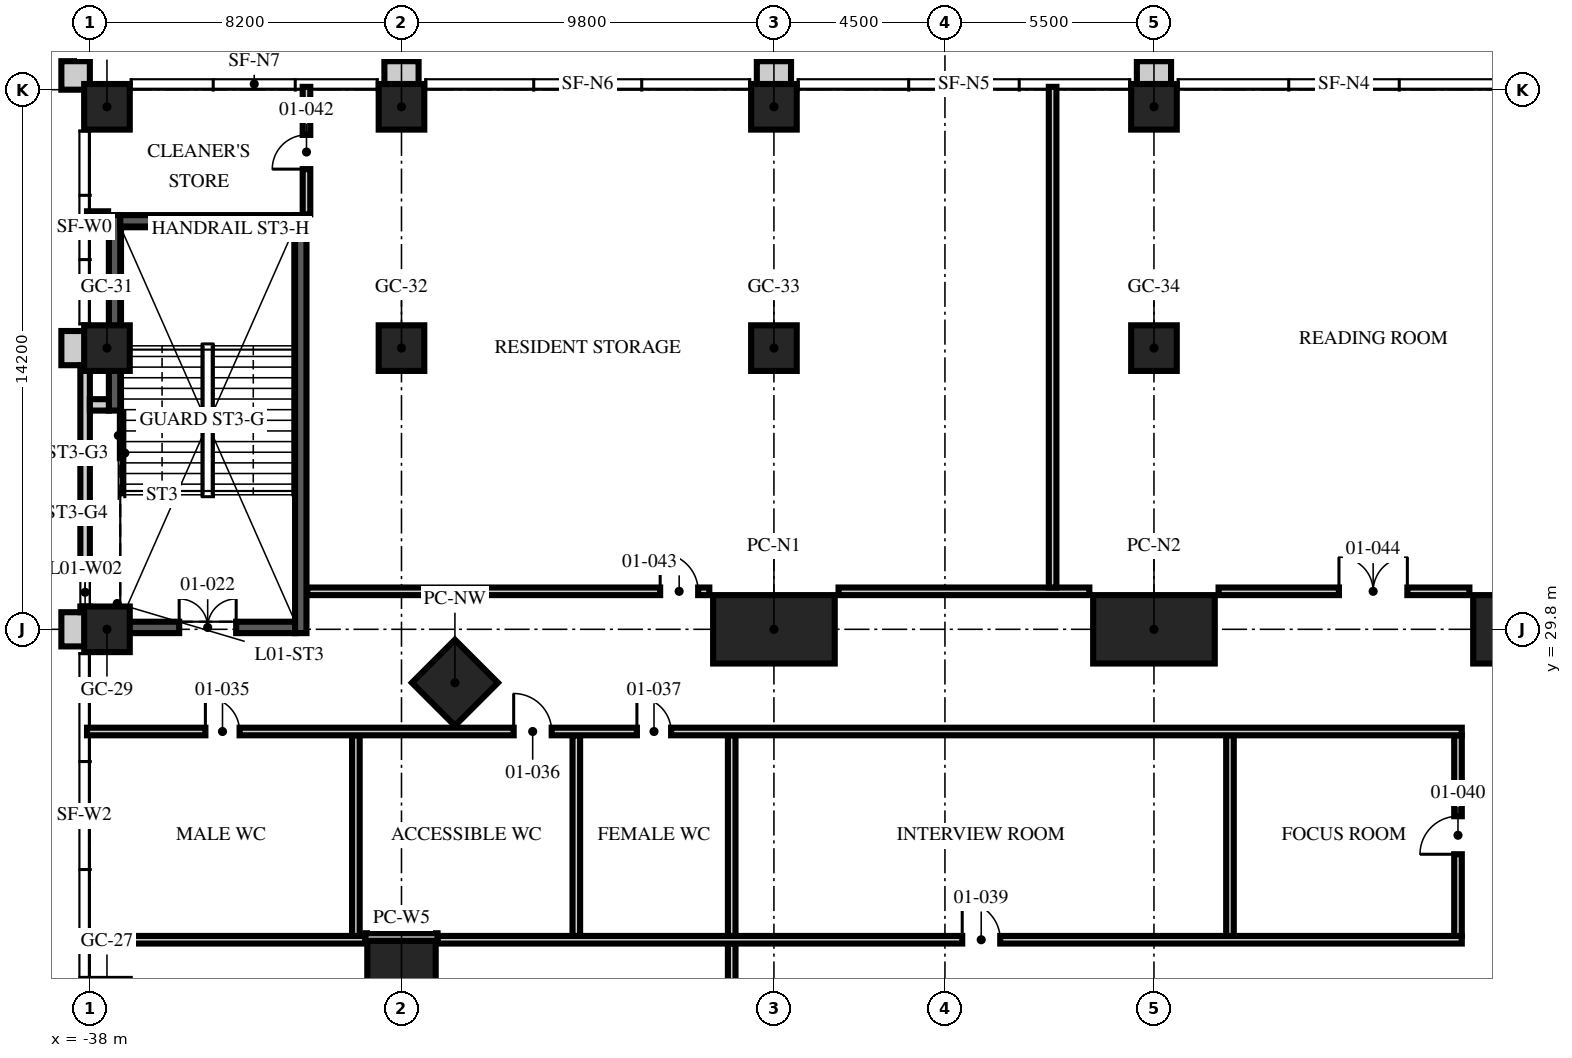
"""IFC4 building model, lengths in metres.
Left out: names, types, materials, properties, quantities, classifications, styles, units other than length and angle.
Written with IfcOpenShell. Run it as: python <this file> out.ifc"""

import sys

from ifc_helpers import new_model, si_unit, direction, frame, frame_2d, origin, origin_2d, place, context, subcontext, project, spatial, rectangle, hollow_rectangle, extrude, element, fill, save


model = new_model("IFC4")
c1 = context("Model", 3, precision=1e-05, world=origin(), true_north=direction((0.0, 1.0)))
c2 = subcontext(c1, "Body", "Model", "MODEL_VIEW")
j1 = project(units=[si_unit("LENGTHUNIT", "METRE"), si_unit("PLANEANGLEUNIT", "RADIAN")], contexts=[c1])
p1 = place(None, origin())
s1 = spatial("IfcSite", under=j1, at=p1, CompositionType="ELEMENT")
p2 = place(p1, origin())
s2 = spatial("IfcBuilding", under=s1, at=p2, CompositionType="ELEMENT")
p3 = place(p2, frame((0.0, 0.0, 6.0)))
s3 = spatial("IfcBuildingStorey", under=s2, at=p3, CompositionType="ELEMENT", Elevation=6.0)
for number, where, z_axis, x_axis in (
    (1, (-20.0, 29.8, 0.0), (0.0, 0.0, 1.0), (1.0, 0.0, 0.0)),
    (2, (-10.0, 29.8, 0.0), (0.0, 0.0, 1.0), (1.0, 0.0, 0.0)),
    (3, (0.0, 29.8, 0.0), (0.0, 0.0, 1.0), (1.0, 0.0, 0.0)),
    (4, (-29.8, 20.0, 0.0), (0.0, 0.0, 1.0), (0.0, 1.0, 0.0)),
):
    element("IfcColumn", number, at=place(p3, frame(where, z_axis=z_axis, x_axis=x_axis)), inside=s3, PredefinedType="COLUMN", context=c2, shape_type="SweptSolid", body=[
        extrude(hollow_rectangle(XDim=3.2, YDim=1.8, WallThickness=0.2, at=origin_2d()), origin(), (0.0, 0.0, 1.0), 5.0),
    ])
p4 = place(p3, frame((-28.394, 28.394, 0.0), z_axis=(0.0, 0.0, 1.0), x_axis=(0.707106781187, 0.707106781187, 0.0)))
e5 = element("IfcColumn", 5, at=p4, inside=s3, PredefinedType="COLUMN", context=c2, shape_type="SweptSolid", body=[
    extrude(hollow_rectangle(XDim=1.6, YDim=1.6, WallThickness=0.1, at=origin_2d()), origin(), (0.0, 0.0, 1.0), 5.0),
])
for number, where, z_axis, x_axis in (
    (6, (-37.55, 29.8, 0.0), (0.0, 0.0, 1.0), (1.0, 0.0, 0.0)),
    (7, (-37.55, 37.2, 0.0), (0.0, 0.0, 1.0), (1.0, 0.0, 0.0)),
    (8, (-29.8, 37.2, 0.0), (0.0, 0.0, 1.0), (1.0, 0.0, 0.0)),
    (9, (-20.0, 37.2, 0.0), (0.0, 0.0, 1.0), (1.0, 0.0, 0.0)),
    (10, (-10.0, 37.2, 0.0), (0.0, 0.0, 1.0), (1.0, 0.0, 0.0)),
    (11, (-37.55, 43.55, 0.0), (0.0, 0.0, 1.0), (1.0, 0.0, 0.0)),
    (12, (-29.8, 43.55, 0.0), (0.0, 0.0, 1.0), (1.0, 0.0, 0.0)),
    (13, (-20.0, 43.55, 0.0), (0.0, 0.0, 1.0), (1.0, 0.0, 0.0)),
    (14, (-10.0, 43.55, 0.0), (0.0, 0.0, 1.0), (1.0, 0.0, 0.0)),
):
    element("IfcColumn", number, at=place(p3, frame(where, z_axis=z_axis, x_axis=x_axis)), inside=s3, PredefinedType="COLUMN", context=c2, shape_type="SweptSolid", body=[
        extrude(rectangle(XDim=1.2, YDim=1.2, at=origin_2d()), origin(), (0.0, 0.0, 1.0), 5.0),
    ])
for number, where, z_axis, x_axis in (
    (15, (-9.55, 44.375, 0.0), (0.0, 0.0, 1.0), (-1.0, 0.0, 0.0)),
    (16, (-19.55, 44.375, 0.0), (0.0, 0.0, 1.0), (-1.0, 0.0, 0.0)),
    (17, (-29.35, 44.375, 0.0), (0.0, 0.0, 1.0), (-1.0, 0.0, 0.0)),
):
    element("IfcWall", number, at=place(p3, frame(where, z_axis=z_axis, x_axis=x_axis)), inside=s3, PredefinedType="SOLIDWALL", context=c2, shape_type="SweptSolid", body=[
        extrude(rectangle(XDim=0.9, YDim=0.75, at=frame_2d((0.45, 0.0))), origin(), (0.0, 0.0, 1.0), 5.0),
    ])
p5 = place(p3, frame((-38.0, 44.375, 0.0), z_axis=(0.0, 0.0, 1.0), x_axis=(-1.0, 0.0, 0.0)))
e18 = element("IfcWall", 18, at=p5, inside=s3, PredefinedType="SOLIDWALL", context=c2, shape_type="SweptSolid", body=[
    extrude(rectangle(XDim=0.75, YDim=0.75, at=frame_2d((0.375, 0.0))), origin(), (0.0, 0.0, 1.0), 5.0),
])
for number, where, z_axis, x_axis in (
    (19, (-38.375, 37.65, 0.0), (0.0, 0.0, 1.0), (0.0, -1.0, 0.0)),
    (20, (-38.375, 30.25, 0.0), (0.0, 0.0, 1.0), (0.0, -1.0, 0.0)),
):
    element("IfcWall", number, at=place(p3, frame(where, z_axis=z_axis, x_axis=x_axis)), inside=s3, PredefinedType="SOLIDWALL", context=c2, shape_type="SweptSolid", body=[
        extrude(rectangle(XDim=0.9, YDim=0.75, at=frame_2d((0.45, 0.0))), origin(), (0.0, 0.0, 1.0), 5.0),
    ])
p6 = place(p3, frame((-38.125, 36.75, 0.0), z_axis=(0.0, 0.0, 1.0), x_axis=(0.0, -1.0, 0.0)))
e21 = element("IfcWall", 21, at=p6, inside=s3, PredefinedType="SOLIDWALL", context=c2, shape_type="SweptSolid", body=[
    extrude(rectangle(XDim=6.5, YDim=0.25, at=frame_2d((3.25, 0.0))), origin(), (0.0, 0.0, 1.0), 5.0),
])
p7 = place(p6, frame((5.6, 0.0, 1.2)))
e22 = element("IfcOpeningElement", 22, at=p7, cuts=e21, PredefinedType="OPENING", context=c2, shape_type="SweptSolid", body=[
    extrude(rectangle(XDim=0.75, YDim=1.7, at=frame_2d((0.375, 0.85))), frame((0.0, 0.135, 0.0), z_axis=(0.0, -1.0, 0.0), x_axis=(1.0, 0.0, 0.0)), (0.0, 0.0, 1.0), 0.27),
])
p8 = place(p3, frame((-37.35, 35.556, 0.0), z_axis=(0.0, 0.0, 1.0), x_axis=(0.0, 1.0, 0.0)))
e23 = element("IfcWall", 23, at=p8, inside=s3, PredefinedType="SOLIDWALL", context=c2, shape_type="SweptSolid", body=[
    extrude(rectangle(XDim=5.144, YDim=0.3, at=frame_2d((2.572, 0.0))), origin(), (0.0, 0.0, 1.0), 4.7),
])
p9 = place(p3, frame((-38.0, 35.706, 0.0), z_axis=(0.0, 0.0, 1.0), x_axis=(1.0, 0.0, 0.0)))
e24 = element("IfcWall", 24, at=p9, inside=s3, PredefinedType="PARTITIONING", context=c2, shape_type="SweptSolid", body=[
    extrude(rectangle(XDim=0.5, YDim=0.3, at=frame_2d((0.25, 0.0))), origin(), (0.0, 0.0, 1.0), 3.27),
])
p10 = place(p3, frame((-38.0, 29.85, 0.0), z_axis=(0.0, 0.0, 1.0), x_axis=(1.0, 0.0, 0.0)))
e25 = element("IfcWall", 25, at=p10, inside=s3, PredefinedType="SOLIDWALL", context=c2, shape_type="SweptSolid", body=[
    extrude(rectangle(XDim=5.4, YDim=0.3, at=frame_2d((2.7, 0.0))), origin(), (0.0, 0.0, 1.0), 4.7),
])
p11 = place(p10, frame((2.35, 0.0, 0.0)))
e26 = element("IfcOpeningElement", 26, at=p11, cuts=e25, PredefinedType="OPENING", context=c2, shape_type="SweptSolid", body=[
    extrude(rectangle(XDim=1.5, YDim=2.1, at=frame_2d((0.75, 1.05))), frame((0.0, 0.16, 0.0), z_axis=(0.0, -1.0, 0.0), x_axis=(1.0, 0.0, 0.0)), (0.0, 0.0, 1.0), 0.32),
])
p12 = place(p3, frame((-32.45, 29.7, 0.0), z_axis=(0.0, 0.0, 1.0), x_axis=(0.0, 1.0, 0.0)))
e27 = element("IfcWall", 27, at=p12, inside=s3, PredefinedType="SOLIDWALL", context=c2, shape_type="SweptSolid", body=[
    extrude(rectangle(XDim=11.0, YDim=0.3, at=frame_2d((5.5, 0.0))), origin(), (0.0, 0.0, 1.0), 4.7),
])
p13 = place(p3, frame((-37.2, 40.55, 0.0), z_axis=(0.0, 0.0, 1.0), x_axis=(1.0, 0.0, 0.0)))
e28 = element("IfcWall", 28, at=p13, inside=s3, PredefinedType="SOLIDWALL", context=c2, shape_type="SweptSolid", body=[
    extrude(rectangle(XDim=4.6, YDim=0.3, at=frame_2d((2.3, 0.0))), origin(), (0.0, 0.0, 1.0), 4.7),
])
p14 = place(p3, frame((-21.111, -20.491, 0.0), z_axis=(0.0, 0.0, 1.0), x_axis=(0.0, 1.0, 0.0)))
e29 = element("IfcWall", 29, at=p14, inside=s3, PredefinedType="SOLIDWALL", context=c2, shape_type="SweptSolid", body=[
    extrude(rectangle(XDim=42.022, YDim=0.2, at=frame_2d((21.011, 0.0))), origin(), (0.0, 0.0, 1.0), 3.5),
])
p15 = place(p14, frame((4.47, 0.0, 0.0)))
e30 = element("IfcOpeningElement", 30, at=p15, cuts=e29, PredefinedType="OPENING", context=c2, shape_type="SweptSolid", body=[
    extrude(rectangle(XDim=1.8, YDim=2.4, at=frame_2d((0.9, 1.2))), frame((0.0, 0.11, 0.0), z_axis=(0.0, -1.0, 0.0), x_axis=(1.0, 0.0, 0.0)), (0.0, 0.0, 1.0), 0.22),
])
p16 = place(p14, frame((17.537, 0.0, 0.0)))
e31 = element("IfcOpeningElement", 31, at=p16, cuts=e29, PredefinedType="OPENING", context=c2, shape_type="SweptSolid", body=[
    extrude(rectangle(XDim=1.0, YDim=2.1, at=frame_2d((0.5, 1.05))), frame((0.0, 0.11, 0.0), z_axis=(0.0, -1.0, 0.0), x_axis=(1.0, 0.0, 0.0)), (0.0, 0.0, 1.0), 0.22),
])
p17 = place(p14, frame((32.768, 0.0, 0.0)))
e32 = element("IfcOpeningElement", 32, at=p17, cuts=e29, PredefinedType="OPENING", context=c2, shape_type="SweptSolid", body=[
    extrude(rectangle(XDim=1.8, YDim=2.4, at=frame_2d((0.9, 1.2))), frame((0.0, 0.11, 0.0), z_axis=(0.0, -1.0, 0.0), x_axis=(1.0, 0.0, 0.0)), (0.0, 0.0, 1.0), 0.22),
])
p18 = place(p3, frame((-38.075, 21.631, 0.0), z_axis=(0.0, 0.0, 1.0), x_axis=(1.0, 0.0, 0.0)))
e33 = element("IfcWall", 33, at=p18, inside=s3, PredefinedType="SOLIDWALL", context=c2, shape_type="SweptSolid", body=[
    extrude(rectangle(XDim=7.325, YDim=0.2, at=frame_2d((3.663, 0.0))), origin(), (0.0, 0.0, 1.0), 3.7),
])
p19 = place(p3, frame((-28.85, 21.631, 0.0), z_axis=(0.0, 0.0, 1.0), x_axis=(1.0, 0.0, 0.0)))
e34 = element("IfcWall", 34, at=p19, inside=s3, PredefinedType="SOLIDWALL", context=c2, shape_type="SweptSolid", body=[
    extrude(rectangle(XDim=26.95, YDim=0.2, at=frame_2d((13.475, 0.0))), origin(), (0.0, 0.0, 1.0), 3.5),
])
p20 = place(p19, frame((13.804, 0.0, 0.0)))
e35 = element("IfcOpeningElement", 35, at=p20, cuts=e34, PredefinedType="OPENING", context=c2, shape_type="SweptSolid", body=[
    extrude(rectangle(XDim=1.0, YDim=2.1, at=frame_2d((0.5, 1.05))), frame((0.0, 0.11, 0.0), z_axis=(0.0, -1.0, 0.0), x_axis=(1.0, 0.0, 0.0)), (0.0, 0.0, 1.0), 0.22),
])
p21 = place(p3, frame((-30.75, 21.702, 0.0), z_axis=(0.0, 0.0, 1.0), x_axis=(1.0, 0.0, 0.0)))
e36 = element("IfcWall", 36, at=p21, inside=s3, PredefinedType="SOLIDWALL", context=c2, shape_type="SweptSolid", body=[
    extrude(rectangle(XDim=1.9, YDim=0.2, at=frame_2d((0.95, 0.0))), origin(), (0.0, 0.0, 1.0), 3.7),
])
p22 = place(p3, frame((-31.0, 21.731, 0.0), z_axis=(0.0, 0.0, 1.0), x_axis=(0.0, 1.0, 0.0)))
e37 = element("IfcWall", 37, at=p22, inside=s3, PredefinedType="SOLIDWALL", context=c2, shape_type="SweptSolid", body=[
    extrude(rectangle(XDim=5.28, YDim=0.2, at=frame_2d((2.64, 0.0))), origin(), (0.0, 0.0, 1.0), 4.7),
])
p23 = place(p3, frame((-25.2, 21.731, 0.0), z_axis=(0.0, 0.0, 1.0), x_axis=(0.0, 1.0, 0.0)))
e38 = element("IfcWall", 38, at=p23, inside=s3, PredefinedType="SOLIDWALL", context=c2, shape_type="SweptSolid", body=[
    extrude(rectangle(XDim=5.28, YDim=0.2, at=frame_2d((2.64, 0.0))), origin(), (0.0, 0.0, 1.0), 3.5),
])
for number, where, z_axis, x_axis in (
    (39, (-21.111, 21.731, 0.0), (0.0, 0.0, 1.0), (0.0, 1.0, 0.0)),
    (40, (-8.0, 21.731, 0.0), (0.0, 0.0, 1.0), (0.0, 1.0, 0.0)),
):
    element("IfcWall", number, at=place(p3, frame(where, z_axis=z_axis, x_axis=x_axis)), inside=s3, PredefinedType="SOLIDWALL", context=c2, shape_type="SweptSolid", body=[
        extrude(rectangle(XDim=5.28, YDim=0.2, at=frame_2d((2.64, 0.0))), origin(), (0.0, 0.0, 1.0), 4.7),
    ])
p24 = place(p3, frame((-2.0, 21.731, 0.0), z_axis=(0.0, 0.0, 1.0), x_axis=(0.0, 1.0, 0.0)))
e41 = element("IfcWall", 41, at=p24, inside=s3, PredefinedType="SOLIDWALL", context=c2, shape_type="SweptSolid", body=[
    extrude(rectangle(XDim=5.28, YDim=0.2, at=frame_2d((2.64, 0.0))), origin(), (0.0, 0.0, 1.0), 4.7),
])
p25 = place(p24, frame((2.15, 0.0, 0.0)))
e42 = element("IfcOpeningElement", 42, at=p25, cuts=e41, PredefinedType="OPENING", context=c2, shape_type="SweptSolid", body=[
    extrude(rectangle(XDim=1.0, YDim=2.1, at=frame_2d((0.5, 1.05))), frame((0.0, 0.11, 0.0), z_axis=(0.0, -1.0, 0.0), x_axis=(1.0, 0.0, 0.0)), (0.0, 0.0, 1.0), 0.22),
])
p26 = place(p3, frame((-38.075, 27.111, 0.0), z_axis=(0.0, 0.0, 1.0), x_axis=(1.0, 0.0, 0.0)))
e43 = element("IfcWall", 43, at=p26, inside=s3, PredefinedType="SOLIDWALL", context=c2, shape_type="SweptSolid", body=[
    extrude(rectangle(XDim=36.175, YDim=0.2, at=frame_2d((18.087, 0.0))), origin(), (0.0, 0.0, 1.0), 3.5),
])
p27 = place(p26, frame((3.115, 0.0, 0.0)))
e44 = element("IfcOpeningElement", 44, at=p27, cuts=e43, PredefinedType="OPENING", context=c2, shape_type="SweptSolid", body=[
    extrude(rectangle(XDim=0.9, YDim=2.1, at=frame_2d((0.45, 1.05))), frame((0.0, 0.11, 0.0), z_axis=(0.0, -1.0, 0.0), x_axis=(1.0, 0.0, 0.0)), (0.0, 0.0, 1.0), 0.22),
])
p28 = place(p26, frame((11.227, 0.0, 0.0)))
e45 = element("IfcOpeningElement", 45, at=p28, cuts=e43, PredefinedType="OPENING", context=c2, shape_type="SweptSolid", body=[
    extrude(rectangle(XDim=1.0, YDim=2.1, at=frame_2d((0.5, 1.05))), frame((0.0, 0.11, 0.0), z_axis=(0.0, -1.0, 0.0), x_axis=(1.0, 0.0, 0.0)), (0.0, 0.0, 1.0), 0.22),
])
p29 = place(p26, frame((14.469, 0.0, 0.0)))
e46 = element("IfcOpeningElement", 46, at=p29, cuts=e43, PredefinedType="OPENING", context=c2, shape_type="SweptSolid", body=[
    extrude(rectangle(XDim=0.9, YDim=2.1, at=frame_2d((0.45, 1.05))), frame((0.0, 0.11, 0.0), z_axis=(0.0, -1.0, 0.0), x_axis=(1.0, 0.0, 0.0)), (0.0, 0.0, 1.0), 0.22),
])
p30 = place(p3, frame((-32.28, 30.8, 0.0), z_axis=(0.0, 0.0, 1.0), x_axis=(1.0, 0.0, 0.0)))
e47 = element("IfcWall", 47, at=p30, inside=s3, PredefinedType="SOLIDWALL", context=c2, shape_type="SweptSolid", body=[
    extrude(rectangle(XDim=10.58, YDim=0.2, at=frame_2d((5.29, 0.0))), origin(), (0.0, 0.0, 1.0), 4.7),
])
p31 = place(p30, frame((9.287, 0.0, 0.0)))
e48 = element("IfcOpeningElement", 48, at=p31, cuts=e47, PredefinedType="OPENING", context=c2, shape_type="SweptSolid", body=[
    extrude(rectangle(XDim=1.0, YDim=2.1, at=frame_2d((0.5, 1.05))), frame((0.0, 0.11, 0.0), z_axis=(0.0, -1.0, 0.0), x_axis=(1.0, 0.0, 0.0)), (0.0, 0.0, 1.0), 0.22),
])
p32 = place(p3, frame((-18.3, 30.8, 0.0), z_axis=(0.0, 0.0, 1.0), x_axis=(1.0, 0.0, 0.0)))
e49 = element("IfcWall", 49, at=p32, inside=s3, PredefinedType="SOLIDWALL", context=c2, shape_type="SweptSolid", body=[
    extrude(rectangle(XDim=6.6, YDim=0.2, at=frame_2d((3.3, 0.0))), origin(), (0.0, 0.0, 1.0), 4.7),
])
p33 = place(p3, frame((-8.3, 30.8, 0.0), z_axis=(0.0, 0.0, 1.0), x_axis=(1.0, 0.0, 0.0)))
e50 = element("IfcWall", 50, at=p33, inside=s3, PredefinedType="SOLIDWALL", context=c2, shape_type="SweptSolid", body=[
    extrude(rectangle(XDim=6.6, YDim=0.2, at=frame_2d((3.3, 0.0))), origin(), (0.0, 0.0, 1.0), 4.7),
])
p34 = place(p33, frame((3.167, 0.0, 0.0)))
e51 = element("IfcOpeningElement", 51, at=p34, cuts=e50, PredefinedType="OPENING", context=c2, shape_type="SweptSolid", body=[
    extrude(rectangle(XDim=1.8, YDim=2.4, at=frame_2d((0.9, 1.2))), frame((0.0, 0.11, 0.0), z_axis=(0.0, -1.0, 0.0), x_axis=(1.0, 0.0, 0.0)), (0.0, 0.0, 1.0), 0.22),
])
p35 = place(p3, frame((-12.667, 30.9, 0.0), z_axis=(0.0, 0.0, 1.0), x_axis=(0.0, 1.0, 0.0)))
e52 = element("IfcWall", 52, at=p35, inside=s3, PredefinedType="SOLIDWALL", context=c2, shape_type="SweptSolid", body=[
    extrude(rectangle(XDim=13.175, YDim=0.2, at=frame_2d((6.587, 0.0))), origin(), (0.0, 0.0, 1.0), 3.7),
])
p36 = place(p3, frame((-38.075, 40.7, 0.0), z_axis=(0.0, 0.0, 1.0), x_axis=(1.0, 0.0, 0.0)))
e53 = element("IfcWall", 53, at=p36, inside=s3, PredefinedType="SOLIDWALL", context=c2, shape_type="SweptSolid", body=[
    extrude(rectangle(XDim=0.555, YDim=0.2, at=frame_2d((0.277, 0.0))), origin(), (0.0, 0.0, 1.0), 3.27),
])
p37 = place(p3, frame((-32.3, 40.72, 0.0), z_axis=(0.0, 0.0, 1.0), x_axis=(0.0, 1.0, 0.0)))
e54 = element("IfcWall", 54, at=p37, inside=s3, PredefinedType="SOLIDWALL", context=c2, shape_type="SweptSolid", body=[
    extrude(rectangle(XDim=3.355, YDim=0.2, at=frame_2d((1.677, 0.0))), origin(), (0.0, 0.0, 1.0), 3.7),
])
p38 = place(p37, frame((1.19, 0.0, 0.0)))
e55 = element("IfcOpeningElement", 55, at=p38, cuts=e54, PredefinedType="OPENING", context=c2, shape_type="SweptSolid", body=[
    extrude(rectangle(XDim=0.9, YDim=2.1, at=frame_2d((0.45, 1.05))), frame((0.0, 0.11, 0.0), z_axis=(0.0, -1.0, 0.0), x_axis=(1.0, 0.0, 0.0)), (0.0, 0.0, 1.0), 0.22),
])
p39 = place(p7, origin())
e56 = element("IfcWindow", 56, at=p39, inside=s3, PartitioningType="SINGLE_PANEL", PredefinedType="WINDOW", context=c2, shape_type="SweptSolid", body=[
    extrude(rectangle(XDim=0.75, YDim=1.7, at=frame_2d((0.375, 0.85))), frame((0.0, 0.03, 0.0), z_axis=(0.0, -1.0, 0.0), x_axis=(1.0, 0.0, 0.0)), (0.0, 0.0, 1.0), 0.06),
])
fill(e22, e56)
p40 = place(p11, origin())
e57 = element("IfcDoor", 57, at=p40, inside=s3, OperationType="DOUBLE_DOOR_SINGLE_SWING", PredefinedType="DOOR", context=c2, shape_type="SweptSolid", body=[
    extrude(rectangle(XDim=1.5, YDim=2.1, at=frame_2d((0.75, 1.05))), frame((0.0, 0.025, 0.0), z_axis=(0.0, -1.0, 0.0), x_axis=(1.0, 0.0, 0.0)), (0.0, 0.0, 1.0), 0.05),
])
fill(e26, e57)
p41 = place(p27, origin())
e58 = element("IfcDoor", 58, at=p41, inside=s3, OperationType="SINGLE_SWING_LEFT", PredefinedType="DOOR", context=c2, shape_type="SweptSolid", body=[
    extrude(rectangle(XDim=0.9, YDim=2.1, at=frame_2d((0.45, 1.05))), frame((0.0, 0.025, 0.0), z_axis=(0.0, -1.0, 0.0), x_axis=(1.0, 0.0, 0.0)), (0.0, 0.0, 1.0), 0.05),
])
fill(e44, e58)
p42 = place(p28, origin())
e59 = element("IfcDoor", 59, at=p42, inside=s3, OperationType="SINGLE_SWING_LEFT", PredefinedType="DOOR", context=c2, shape_type="SweptSolid", body=[
    extrude(rectangle(XDim=1.0, YDim=2.1, at=frame_2d((0.5, 1.05))), frame((0.0, 0.025, 0.0), z_axis=(0.0, -1.0, 0.0), x_axis=(1.0, 0.0, 0.0)), (0.0, 0.0, 1.0), 0.05),
])
fill(e45, e59)
p43 = place(p29, origin())
e60 = element("IfcDoor", 60, at=p43, inside=s3, OperationType="SINGLE_SWING_LEFT", PredefinedType="DOOR", context=c2, shape_type="SweptSolid", body=[
    extrude(rectangle(XDim=0.9, YDim=2.1, at=frame_2d((0.45, 1.05))), frame((0.0, 0.025, 0.0), z_axis=(0.0, -1.0, 0.0), x_axis=(1.0, 0.0, 0.0)), (0.0, 0.0, 1.0), 0.05),
])
fill(e46, e60)
p44 = place(p20, origin())
e61 = element("IfcDoor", 61, at=p44, inside=s3, OperationType="SINGLE_SWING_LEFT", PredefinedType="DOOR", context=c2, shape_type="SweptSolid", body=[
    extrude(rectangle(XDim=1.0, YDim=2.1, at=frame_2d((0.5, 1.05))), frame((0.0, 0.025, 0.0), z_axis=(0.0, -1.0, 0.0), x_axis=(1.0, 0.0, 0.0)), (0.0, 0.0, 1.0), 0.05),
])
fill(e35, e61)
p45 = place(p25, origin())
e62 = element("IfcDoor", 62, at=p45, inside=s3, OperationType="SINGLE_SWING_LEFT", PredefinedType="DOOR", context=c2, shape_type="SweptSolid", body=[
    extrude(rectangle(XDim=1.0, YDim=2.1, at=frame_2d((0.5, 1.05))), frame((0.0, 0.025, 0.0), z_axis=(0.0, -1.0, 0.0), x_axis=(1.0, 0.0, 0.0)), (0.0, 0.0, 1.0), 0.05),
])
fill(e42, e62)
p46 = place(p38, origin())
e63 = element("IfcDoor", 63, at=p46, inside=s3, OperationType="SINGLE_SWING_LEFT", PredefinedType="DOOR", context=c2, shape_type="SweptSolid", body=[
    extrude(rectangle(XDim=0.9, YDim=2.1, at=frame_2d((0.45, 1.05))), frame((0.0, 0.025, 0.0), z_axis=(0.0, -1.0, 0.0), x_axis=(1.0, 0.0, 0.0)), (0.0, 0.0, 1.0), 0.05),
])
fill(e55, e63)
p47 = place(p31, origin())
e64 = element("IfcDoor", 64, at=p47, inside=s3, OperationType="SINGLE_SWING_LEFT", PredefinedType="DOOR", context=c2, shape_type="SweptSolid", body=[
    extrude(rectangle(XDim=1.0, YDim=2.1, at=frame_2d((0.5, 1.05))), frame((0.0, 0.025, 0.0), z_axis=(0.0, -1.0, 0.0), x_axis=(1.0, 0.0, 0.0)), (0.0, 0.0, 1.0), 0.05),
])
fill(e48, e64)
p48 = place(p34, origin())
e65 = element("IfcDoor", 65, at=p48, inside=s3, OperationType="DOUBLE_DOOR_SINGLE_SWING", PredefinedType="DOOR", context=c2, shape_type="SweptSolid", body=[
    extrude(rectangle(XDim=1.8, YDim=2.4, at=frame_2d((0.9, 1.2))), frame((0.0, 0.025, 0.0), z_axis=(0.0, -1.0, 0.0), x_axis=(1.0, 0.0, 0.0)), (0.0, 0.0, 1.0), 0.05),
])
fill(e51, e65)
save(model, sys.argv[1])
